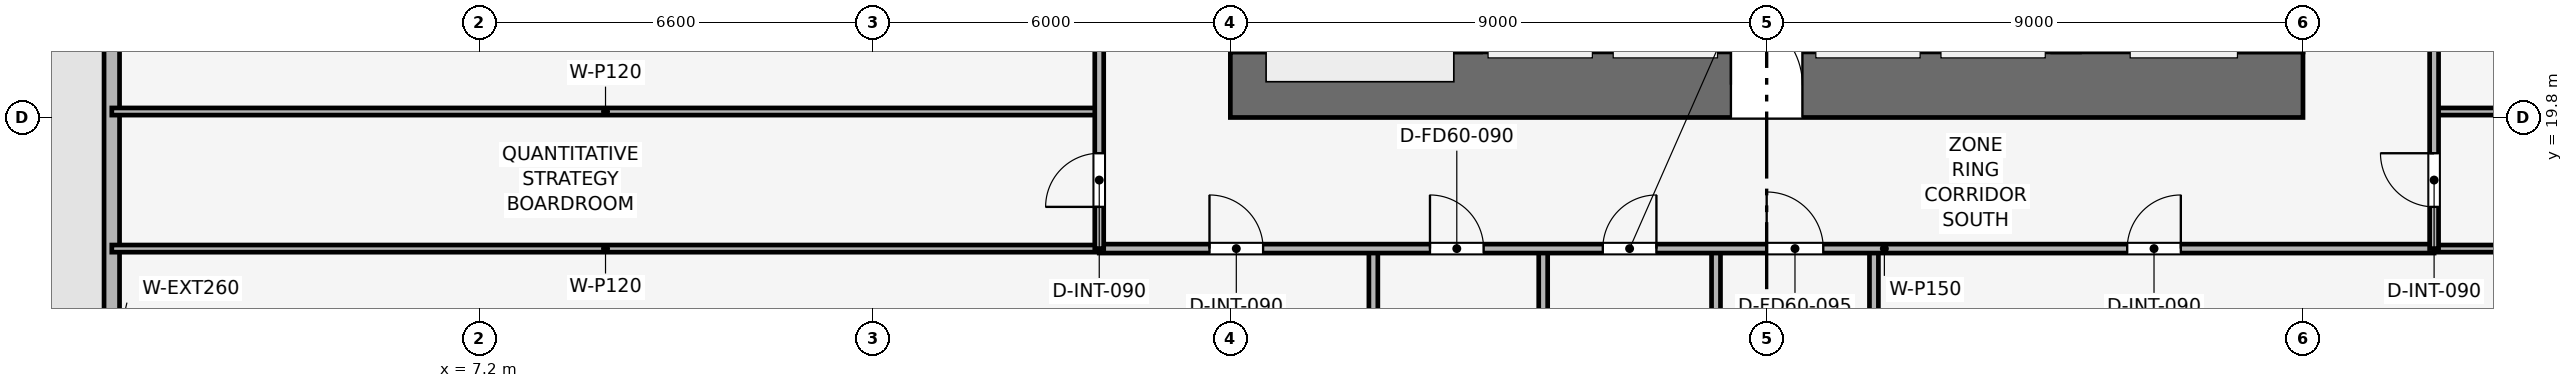
"""IFC4 building model, lengths in metres.
Left out: names, types, materials, properties, quantities, classifications, styles, units other than length and angle.
Written with IfcOpenShell. Run it as: python <this file> out.ifc"""

import sys

from ifc_helpers import new_model, si_unit, direction, frame, frame_2d, origin, place, context, subcontext, project, spatial, rectangle, extrude, element, fill, save


model = new_model("IFC4")
c1 = context("Model", 3, precision=1e-05, world=origin(), true_north=direction((0.0, 1.0)))
c2 = subcontext(c1, "Body", "Model", "MODEL_VIEW")
j1 = project(units=[si_unit("LENGTHUNIT", "METRE"), si_unit("PLANEANGLEUNIT", "RADIAN")], contexts=[c1])
p1 = place(None, origin())
s1 = spatial("IfcSite", under=j1, at=p1, CompositionType="ELEMENT")
p2 = place(p1, origin())
s2 = spatial("IfcBuilding", under=s1, at=p2, CompositionType="ELEMENT")
p3 = place(p2, frame((0.0, 0.0, 92.4)))
s3 = spatial("IfcBuildingStorey", under=s2, at=p3, CompositionType="ELEMENT", Elevation=92.4)
p4 = place(p3, frame((19.8, 20.35, 0.0), z_axis=(0.0, 0.0, 1.0), x_axis=(1.0, 0.0, 0.0)))
e1 = element("IfcWall", 1, at=p4, inside=s3, PredefinedType="SHEAR", context=c2, shape_type="SweptSolid", body=[
    extrude(rectangle(XDim=18.0, YDim=1.1, at=frame_2d((9.0, 0.0))), origin(), (0.0, 0.0, 1.0), 3.9),
])
p5 = place(p4, frame((8.4, 0.0, 0.0)))
e2 = element("IfcOpeningElement", 2, at=p5, cuts=e1, PredefinedType="OPENING", context=c2, shape_type="SweptSolid", body=[
    extrude(rectangle(XDim=1.2, YDim=2.2, at=frame_2d((0.6, 1.1))), frame((0.0, 0.56, 0.0), z_axis=(0.0, -1.0, 0.0), x_axis=(1.0, 0.0, 0.0)), (0.0, 0.0, 1.0), 1.12),
])
p6 = place(p3, frame((20.35, 20.9, 0.0), z_axis=(0.0, 0.0, 1.0), x_axis=(0.0, 1.0, 0.0)))
e3 = element("IfcWall", 3, at=p6, inside=s3, PredefinedType="SHEAR", context=c2, shape_type="SweptSolid", body=[
    extrude(rectangle(XDim=15.8, YDim=1.1, at=frame_2d((7.9, 0.0))), origin(), (0.0, 0.0, 1.0), 3.9),
])
p7 = place(p6, frame((9.9, 0.0, 0.0)))
e4 = element("IfcOpeningElement", 4, at=p7, cuts=e3, PredefinedType="OPENING", context=c2, shape_type="SweptSolid", body=[
    extrude(rectangle(XDim=1.1, YDim=2.15, at=frame_2d((0.55, 1.075))), frame((0.0, 0.56, 0.0), z_axis=(0.0, -1.0, 0.0), x_axis=(1.0, 0.0, 0.0)), (0.0, 0.0, 1.0), 1.12),
])
p8 = place(p3, frame((37.25, 20.9, 0.0), z_axis=(0.0, 0.0, 1.0), x_axis=(0.0, 1.0, 0.0)))
e5 = element("IfcWall", 5, at=p8, inside=s3, PredefinedType="SHEAR", context=c2, shape_type="SweptSolid", body=[
    extrude(rectangle(XDim=15.8, YDim=1.1, at=frame_2d((7.9, 0.0))), origin(), (0.0, 0.0, 1.0), 3.9),
])
p9 = place(p8, frame((4.4, 0.0, 0.0)))
e6 = element("IfcOpeningElement", 6, at=p9, cuts=e5, PredefinedType="OPENING", context=c2, shape_type="SweptSolid", body=[
    extrude(rectangle(XDim=1.1, YDim=2.15, at=frame_2d((0.55, 1.075))), frame((0.0, 0.56, 0.0), z_axis=(0.0, -1.0, 0.0), x_axis=(1.0, 0.0, 0.0)), (0.0, 0.0, 1.0), 1.12),
])
for number, where, z_axis, x_axis in (
    (7, (23.775, 20.9, 0.0), (0.0, 0.0, 1.0), (0.0, 1.0, 0.0)),
    (8, (33.825, 20.9, 0.0), (0.0, 0.0, 1.0), (0.0, 1.0, 0.0)),
):
    element("IfcWall", number, at=place(p3, frame(where, z_axis=z_axis, x_axis=x_axis)), inside=s3, PredefinedType="SHEAR", context=c2, shape_type="SweptSolid", body=[
        extrude(rectangle(XDim=15.8, YDim=0.45, at=frame_2d((7.9, 0.0))), origin(), (0.0, 0.0, 1.0), 3.9),
    ])
p10 = place(p3, frame((1.03, 8.7, 0.0), z_axis=(0.0, 0.0, 1.0), x_axis=(0.0, 1.0, 0.0)))
e9 = element("IfcWall", 9, at=p10, inside=s3, PredefinedType="SOLIDWALL", context=c2, shape_type="SweptSolid", body=[
    extrude(rectangle(XDim=15.3, YDim=0.26, at=frame_2d((7.65, 0.0))), origin(), (0.0, 0.0, 1.0), 3.65),
])
p11 = place(p10, frame((13.95, 0.0, 0.0)))
e10 = element("IfcOpeningElement", 10, at=p11, cuts=e9, PredefinedType="OPENING", context=c2, shape_type="SweptSolid", body=[
    extrude(rectangle(XDim=1.1, YDim=2.2, at=frame_2d((0.55, 1.1))), frame((0.0, 0.14, 0.0), z_axis=(0.0, -1.0, 0.0), x_axis=(1.0, 0.0, 0.0)), (0.0, 0.0, 1.0), 0.28),
])
p12 = place(p3, frame((22.2, 1.03, 0.0), z_axis=(0.0, 0.0, 1.0), x_axis=(0.0, 1.0, 0.0)))
e11 = element("IfcWall", 11, at=p12, inside=s3, PredefinedType="PARTITIONING", context=c2, shape_type="SweptSolid", body=[
    extrude(rectangle(XDim=16.57, YDim=0.15, at=frame_2d((8.285, 0.0))), origin(), (0.0, 0.0, 1.0), 2.935),
])
p13 = place(p12, frame((6.235, 0.0, 0.0)))
e12 = element("IfcOpeningElement", 12, at=p13, cuts=e11, PredefinedType="OPENING", context=c2, shape_type="SweptSolid", body=[
    extrude(rectangle(XDim=0.9, YDim=2.1, at=frame_2d((0.45, 1.05))), frame((0.0, 0.085, 0.0), z_axis=(0.0, -1.0, 0.0), x_axis=(1.0, 0.0, 0.0)), (0.0, 0.0, 1.0), 0.17),
])
p14 = place(p3, frame((30.6, 1.03, 0.0), z_axis=(0.0, 0.0, 1.0), x_axis=(0.0, 1.0, 0.0)))
e13 = element("IfcWall", 13, at=p14, inside=s3, PredefinedType="PARTITIONING", context=c2, shape_type="SweptSolid", body=[
    extrude(rectangle(XDim=16.57, YDim=0.15, at=frame_2d((8.285, 0.0))), origin(), (0.0, 0.0, 1.0), 2.935),
])
for number, where, z_axis, x_axis in (
    (14, (25.05, 14.4, 0.0), (0.0, 0.0, 1.0), (0.0, 1.0, 0.0)),
    (15, (27.95, 14.4, 0.0), (0.0, 0.0, 1.0), (0.0, 1.0, 0.0)),
):
    element("IfcWall", number, at=place(p3, frame(where, z_axis=z_axis, x_axis=x_axis)), inside=s3, PredefinedType="PARTITIONING", context=c2, shape_type="SweptSolid", body=[
        extrude(rectangle(XDim=3.2, YDim=0.15, at=frame_2d((1.6, 0.0))), origin(), (0.0, 0.0, 1.0), 3.65),
    ])
for number, where, z_axis, x_axis in (
    (16, (1.03, 17.6, 0.0), (0.0, 0.0, 1.0), (1.0, 0.0, 0.0)),
    (17, (40.0, 17.6, 0.0), (0.0, 0.0, 1.0), (1.0, 0.0, 0.0)),
    (18, (1.03, 19.9, 0.0), (0.0, 0.0, 1.0), (1.0, 0.0, 0.0)),
    (19, (40.0, 19.9, 0.0), (0.0, 0.0, 1.0), (1.0, 0.0, 0.0)),
):
    element("IfcWall", number, at=place(p3, frame(where, z_axis=z_axis, x_axis=x_axis)), inside=s3, PredefinedType="PARTITIONING", context=c2, shape_type="SweptSolid", body=[
        extrude(rectangle(XDim=16.57, YDim=0.12, at=frame_2d((8.285, 0.0))), origin(), (0.0, 0.0, 1.0), 2.935),
    ])
p15 = place(p3, frame((17.6, 17.6, 0.0), z_axis=(0.0, 0.0, 1.0), x_axis=(1.0, 0.0, 0.0)))
e20 = element("IfcWall", 20, at=p15, inside=s3, PredefinedType="PARTITIONING", context=c2, shape_type="SweptSolid", body=[
    extrude(rectangle(XDim=22.4, YDim=0.15, at=frame_2d((11.2, 0.0))), origin(), (0.0, 0.0, 1.0), 3.085),
])
p16 = place(p15, frame((1.85, 0.0, 0.0)))
e21 = element("IfcOpeningElement", 21, at=p16, cuts=e20, PredefinedType="OPENING", context=c2, shape_type="SweptSolid", body=[
    extrude(rectangle(XDim=0.9, YDim=2.1, at=frame_2d((0.45, 1.05))), frame((0.0, 0.085, 0.0), z_axis=(0.0, -1.0, 0.0), x_axis=(1.0, 0.0, 0.0)), (0.0, 0.0, 1.0), 0.17),
])
p17 = place(p15, frame((5.55, 0.0, 0.0)))
e22 = element("IfcOpeningElement", 22, at=p17, cuts=e20, PredefinedType="OPENING", context=c2, shape_type="SweptSolid", body=[
    extrude(rectangle(XDim=0.9, YDim=2.1, at=frame_2d((0.45, 1.05))), frame((0.0, 0.085, 0.0), z_axis=(0.0, -1.0, 0.0), x_axis=(1.0, 0.0, 0.0)), (0.0, 0.0, 1.0), 0.17),
])
p18 = place(p15, frame((8.45, 0.0, 0.0)))
e23 = element("IfcOpeningElement", 23, at=p18, cuts=e20, PredefinedType="OPENING", context=c2, shape_type="SweptSolid", body=[
    extrude(rectangle(XDim=0.9, YDim=2.1, at=frame_2d((0.45, 1.05))), frame((0.0, 0.085, 0.0), z_axis=(0.0, -1.0, 0.0), x_axis=(1.0, 0.0, 0.0)), (0.0, 0.0, 1.0), 0.17),
])
p19 = place(p15, frame((11.2, 0.0, 0.0)))
e24 = element("IfcOpeningElement", 24, at=p19, cuts=e20, PredefinedType="OPENING", context=c2, shape_type="SweptSolid", body=[
    extrude(rectangle(XDim=0.95, YDim=2.1, at=frame_2d((0.475, 1.05))), frame((0.0, 0.085, 0.0), z_axis=(0.0, -1.0, 0.0), x_axis=(1.0, 0.0, 0.0)), (0.0, 0.0, 1.0), 0.17),
])
p20 = place(p15, frame((17.25, 0.0, 0.0)))
e25 = element("IfcOpeningElement", 25, at=p20, cuts=e20, PredefinedType="OPENING", context=c2, shape_type="SweptSolid", body=[
    extrude(rectangle(XDim=0.9, YDim=2.1, at=frame_2d((0.45, 1.05))), frame((0.0, 0.085, 0.0), z_axis=(0.0, -1.0, 0.0), x_axis=(1.0, 0.0, 0.0)), (0.0, 0.0, 1.0), 0.17),
])
p21 = place(p3, frame((17.6, 17.6, 0.0), z_axis=(0.0, 0.0, 1.0), x_axis=(0.0, 1.0, 0.0)))
e26 = element("IfcWall", 26, at=p21, inside=s3, PredefinedType="PARTITIONING", context=c2, shape_type="SweptSolid", body=[
    extrude(rectangle(XDim=22.4, YDim=0.15, at=frame_2d((11.2, 0.0))), origin(), (0.0, 0.0, 1.0), 3.085),
])
p22 = place(p21, frame((0.7, 0.0, 0.0)))
e27 = element("IfcOpeningElement", 27, at=p22, cuts=e26, PredefinedType="OPENING", context=c2, shape_type="SweptSolid", body=[
    extrude(rectangle(XDim=0.9, YDim=2.1, at=frame_2d((0.45, 1.05))), frame((0.0, 0.085, 0.0), z_axis=(0.0, -1.0, 0.0), x_axis=(1.0, 0.0, 0.0)), (0.0, 0.0, 1.0), 0.17),
])
p23 = place(p21, frame((6.365, 0.0, 0.0)))
e28 = element("IfcOpeningElement", 28, at=p23, cuts=e26, PredefinedType="OPENING", context=c2, shape_type="SweptSolid", body=[
    extrude(rectangle(XDim=0.9, YDim=2.1, at=frame_2d((0.45, 1.05))), frame((0.0, 0.085, 0.0), z_axis=(0.0, -1.0, 0.0), x_axis=(1.0, 0.0, 0.0)), (0.0, 0.0, 1.0), 0.17),
])
p24 = place(p21, frame((16.415, 0.0, 0.0)))
e29 = element("IfcOpeningElement", 29, at=p24, cuts=e26, PredefinedType="OPENING", context=c2, shape_type="SweptSolid", body=[
    extrude(rectangle(XDim=0.9, YDim=2.1, at=frame_2d((0.45, 1.05))), frame((0.0, 0.085, 0.0), z_axis=(0.0, -1.0, 0.0), x_axis=(1.0, 0.0, 0.0)), (0.0, 0.0, 1.0), 0.17),
])
p25 = place(p3, frame((40.0, 17.6, 0.0), z_axis=(0.0, 0.0, 1.0), x_axis=(0.0, 1.0, 0.0)))
e30 = element("IfcWall", 30, at=p25, inside=s3, PredefinedType="PARTITIONING", context=c2, shape_type="SweptSolid", body=[
    extrude(rectangle(XDim=22.4, YDim=0.15, at=frame_2d((11.2, 0.0))), origin(), (0.0, 0.0, 1.0), 3.085),
])
p26 = place(p25, frame((0.7, 0.0, 0.0)))
e31 = element("IfcOpeningElement", 31, at=p26, cuts=e30, PredefinedType="OPENING", context=c2, shape_type="SweptSolid", body=[
    extrude(rectangle(XDim=0.9, YDim=2.1, at=frame_2d((0.45, 1.05))), frame((0.0, 0.085, 0.0), z_axis=(0.0, -1.0, 0.0), x_axis=(1.0, 0.0, 0.0)), (0.0, 0.0, 1.0), 0.17),
])
p27 = place(p25, frame((4.699, 0.0, 0.0)))
e32 = element("IfcOpeningElement", 32, at=p27, cuts=e30, PredefinedType="OPENING", context=c2, shape_type="SweptSolid", body=[
    extrude(rectangle(XDim=0.9, YDim=2.1, at=frame_2d((0.45, 1.05))), frame((0.0, 0.085, 0.0), z_axis=(0.0, -1.0, 0.0), x_axis=(1.0, 0.0, 0.0)), (0.0, 0.0, 1.0), 0.17),
])
p28 = place(p25, frame((10.692, 0.0, 0.0)))
e33 = element("IfcOpeningElement", 33, at=p28, cuts=e30, PredefinedType="OPENING", context=c2, shape_type="SweptSolid", body=[
    extrude(rectangle(XDim=0.9, YDim=2.1, at=frame_2d((0.45, 1.05))), frame((0.0, 0.085, 0.0), z_axis=(0.0, -1.0, 0.0), x_axis=(1.0, 0.0, 0.0)), (0.0, 0.0, 1.0), 0.17),
])
p29 = place(p25, frame((17.892, 0.0, 0.0)))
e34 = element("IfcOpeningElement", 34, at=p29, cuts=e30, PredefinedType="OPENING", context=c2, shape_type="SweptSolid", body=[
    extrude(rectangle(XDim=0.9, YDim=2.1, at=frame_2d((0.45, 1.05))), frame((0.0, 0.085, 0.0), z_axis=(0.0, -1.0, 0.0), x_axis=(1.0, 0.0, 0.0)), (0.0, 0.0, 1.0), 0.17),
])
p30 = place(p16, origin())
e35 = element("IfcDoor", 35, at=p30, inside=s3, OperationType="SINGLE_SWING_LEFT", PredefinedType="DOOR", context=c2, shape_type="SweptSolid", body=[
    extrude(rectangle(XDim=0.9, YDim=2.1, at=frame_2d((0.45, 1.05))), frame((0.0, 0.025, 0.0), z_axis=(0.0, -1.0, 0.0), x_axis=(1.0, 0.0, 0.0)), (0.0, 0.0, 1.0), 0.05),
])
fill(e21, e35)
p31 = place(p17, origin())
e36 = element("IfcDoor", 36, at=p31, inside=s3, OperationType="SINGLE_SWING_LEFT", PredefinedType="DOOR", context=c2, shape_type="SweptSolid", body=[
    extrude(rectangle(XDim=0.9, YDim=2.1, at=frame_2d((0.45, 1.05))), frame((0.0, 0.025, 0.0), z_axis=(0.0, -1.0, 0.0), x_axis=(1.0, 0.0, 0.0)), (0.0, 0.0, 1.0), 0.05),
])
fill(e22, e36)
p32 = place(p18, origin())
e37 = element("IfcDoor", 37, at=p32, inside=s3, OperationType="SINGLE_SWING_RIGHT", PredefinedType="DOOR", context=c2, shape_type="SweptSolid", body=[
    extrude(rectangle(XDim=0.9, YDim=2.1, at=frame_2d((0.45, 1.05))), frame((0.0, 0.025, 0.0), z_axis=(0.0, -1.0, 0.0), x_axis=(1.0, 0.0, 0.0)), (0.0, 0.0, 1.0), 0.05),
])
fill(e23, e37)
p33 = place(p19, origin())
e38 = element("IfcDoor", 38, at=p33, inside=s3, OperationType="SINGLE_SWING_LEFT", PredefinedType="DOOR", context=c2, shape_type="SweptSolid", body=[
    extrude(rectangle(XDim=0.95, YDim=2.1, at=frame_2d((0.475, 1.05))), frame((0.0, 0.025, 0.0), z_axis=(0.0, -1.0, 0.0), x_axis=(1.0, 0.0, 0.0)), (0.0, 0.0, 1.0), 0.05),
])
fill(e24, e38)
p34 = place(p20, origin())
e39 = element("IfcDoor", 39, at=p34, inside=s3, OperationType="SINGLE_SWING_RIGHT", PredefinedType="DOOR", context=c2, shape_type="SweptSolid", body=[
    extrude(rectangle(XDim=0.9, YDim=2.1, at=frame_2d((0.45, 1.05))), frame((0.0, 0.025, 0.0), z_axis=(0.0, -1.0, 0.0), x_axis=(1.0, 0.0, 0.0)), (0.0, 0.0, 1.0), 0.05),
])
fill(e25, e39)
p35 = place(p22, origin())
e40 = element("IfcDoor", 40, at=p35, inside=s3, OperationType="SINGLE_SWING_LEFT", PredefinedType="DOOR", context=c2, shape_type="SweptSolid", body=[
    extrude(rectangle(XDim=0.9, YDim=2.1, at=frame_2d((0.45, 1.05))), frame((0.0, 0.025, 0.0), z_axis=(0.0, -1.0, 0.0), x_axis=(1.0, 0.0, 0.0)), (0.0, 0.0, 1.0), 0.05),
])
fill(e27, e40)
p36 = place(p26, origin())
e41 = element("IfcDoor", 41, at=p36, inside=s3, OperationType="SINGLE_SWING_RIGHT", PredefinedType="DOOR", context=c2, shape_type="SweptSolid", body=[
    extrude(rectangle(XDim=0.9, YDim=2.1, at=frame_2d((0.45, 1.05))), frame((0.0, 0.025, 0.0), z_axis=(0.0, -1.0, 0.0), x_axis=(1.0, 0.0, 0.0)), (0.0, 0.0, 1.0), 0.05),
])
fill(e31, e41)
p37 = place(p5, origin())
e42 = element("IfcDoor", 42, at=p37, inside=s3, OperationType="SINGLE_SWING_LEFT", PredefinedType="DOOR", context=c2, shape_type="SweptSolid", body=[
    extrude(rectangle(XDim=1.2, YDim=2.2, at=frame_2d((0.6, 1.1))), frame((0.0, 0.025, 0.0), z_axis=(0.0, -1.0, 0.0), x_axis=(1.0, 0.0, 0.0)), (0.0, 0.0, 1.0), 0.05),
])
fill(e2, e42)
save(model, sys.argv[1])
